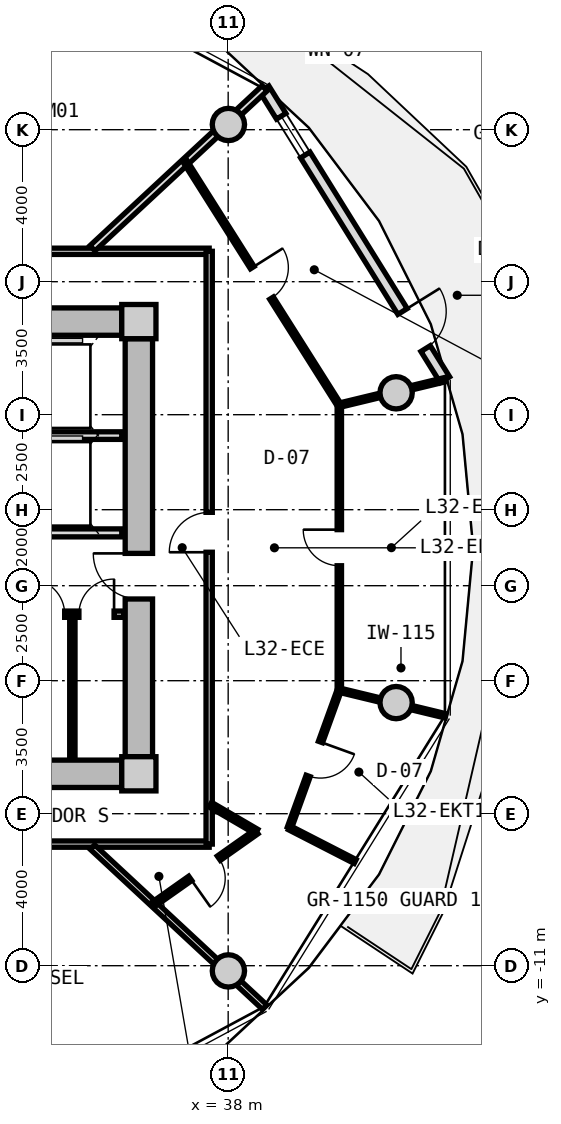
"""IFC4 building model, lengths in metres.
Left out: names, types, materials, properties, quantities, classifications, styles, units other than length and angle.
Written with IfcOpenShell. Run it as: python <this file> out.ifc"""

import sys

from ifc_helpers import new_model, si_unit, direction, frame, frame_2d, origin, origin_2d, place, context, subcontext, project, spatial, rectangle, circle, extrude, source, transform, mapped, element, fill, save


model = new_model("IFC4")
c1 = context("Model", 3, precision=1e-05, world=origin(), true_north=direction((0.0, 1.0)))
c2 = subcontext(c1, "Body", "Model", "MODEL_VIEW")
j1 = project(units=[si_unit("LENGTHUNIT", "METRE"), si_unit("PLANEANGLEUNIT", "RADIAN")], contexts=[c1])
p1 = place(None, origin())
s1 = spatial("IfcSite", under=j1, at=p1, CompositionType="ELEMENT")
p2 = place(p1, origin())
s2 = spatial("IfcBuilding", under=s1, at=p2, CompositionType="ELEMENT")
p3 = place(p2, frame((0.0, 0.0, 105.4)))
s3 = spatial("IfcBuildingStorey", under=s2, at=p3, CompositionType="ELEMENT", Elevation=105.4)
m1 = source(origin(), c2, "Body", "SweptSolid", [
    extrude(rectangle(XDim=0.9, YDim=0.9, at=origin_2d()), origin(), (0.0, 0.0, 1.0), 3.05),
])
for number, where, z_axis, x_axis in (
    (1, (35.65, -5.95, 0.0), (0.0, 0.0, 1.0), (1.0, 0.0, 0.0)),
    (2, (35.65, 5.95, 0.0), (0.0, 0.0, 1.0), (1.0, 0.0, 0.0)),
):
    element("IfcColumn", number, at=place(p3, frame(where, z_axis=z_axis, x_axis=x_axis)), inside=s3, PredefinedType="COLUMN", context=c2, shape_type="MappedRepresentation", body=[
        mapped(m1, transform((0.0, 0.0, 0.0), x_axis=(1.0, 0.0, 0.0), y_axis=(0.0, 1.0, 0.0), z_axis=(0.0, 0.0, 1.0), scale=1.0)),
    ])
m2 = source(origin(), c2, "Body", "SweptSolid", [
    extrude(rectangle(XDim=14.4, YDim=0.72, at=frame_2d((7.2, 0.0))), origin(), (0.0, 0.0, 1.0), 2.79),
])
for number, where, z_axis, x_axis in (
    (3, (20.8, 5.95, 0.0), (0.0, 0.0, 1.0), (1.0, 0.0, 0.0)),
    (4, (35.2, -5.95, 0.0), (0.0, 0.0, 1.0), (-1.0, 0.0, 0.0)),
):
    element("IfcWall", number, at=place(p3, frame(where, z_axis=z_axis, x_axis=x_axis)), inside=s3, PredefinedType="SHEAR", context=c2, shape_type="MappedRepresentation", body=[
        mapped(m2, transform((0.0, 0.0, 0.0), x_axis=(1.0, 0.0, 0.0), y_axis=(0.0, 1.0, 0.0), z_axis=(0.0, 0.0, 1.0), scale=1.0)),
    ])
m3 = source(origin(), c2, "Body", "SweptSolid", [
    extrude(rectangle(XDim=11.0, YDim=0.72, at=frame_2d((5.5, 0.0))), origin(), (0.0, 0.0, 1.0), 2.79),
])
p4 = place(p3, frame((35.65, 5.5, 0.0), z_axis=(0.0, 0.0, 1.0), x_axis=(0.0, -1.0, 0.0)))
e5 = element("IfcWall", 5, at=p4, inside=s3, PredefinedType="SHEAR", context=c2, shape_type="MappedRepresentation", body=[
    mapped(m3, transform((0.0, 0.0, 0.0), x_axis=(1.0, 0.0, 0.0), y_axis=(0.0, 1.0, 0.0), z_axis=(0.0, 0.0, 1.0), scale=1.0)),
])
p5 = place(p4, frame((5.65, 0.0, 0.0)))
e6 = element("IfcOpeningElement", 6, at=p5, cuts=e5, PredefinedType="OPENING", context=c2, shape_type="SweptSolid", body=[
    extrude(rectangle(XDim=1.2, YDim=2.15, at=frame_2d((0.6, 1.075))), frame((0.0, 0.37, 0.0), z_axis=(0.0, -1.0, 0.0), x_axis=(1.0, 0.0, 0.0)), (0.0, 0.0, 1.0), 0.74),
])
m4 = source(origin(), c2, "Body", "SweptSolid", [
    extrude(circle(Radius=0.425, at=origin_2d()), origin(), (0.0, 0.0, 1.0), 3.05),
])
for number, where, z_axis, x_axis in (
    (7, (42.419, 4.076, 0.0), (0.0, 0.0, 1.0), (1.0, 0.0, 0.0)),
    (8, (38.006, 11.137, 0.0), (0.0, 0.0, 1.0), (1.0, 0.0, 0.0)),
    (9, (38.006, -11.137, 0.0), (0.0, 0.0, 1.0), (1.0, 0.0, 0.0)),
    (10, (42.419, -4.076, 0.0), (0.0, 0.0, 1.0), (1.0, 0.0, 0.0)),
):
    element("IfcColumn", number, at=place(p3, frame(where, z_axis=z_axis, x_axis=x_axis)), inside=s3, PredefinedType="COLUMN", context=c2, shape_type="MappedRepresentation", body=[
        mapped(m4, transform((0.0, 0.0, 0.0), x_axis=(1.0, 0.0, 0.0), y_axis=(0.0, 1.0, 0.0), z_axis=(0.0, 0.0, 1.0), scale=1.0)),
    ])
m5 = source(origin(), c2, "Body", "SweptSolid", [
    extrude(rectangle(XDim=9.014, YDim=0.29, at=frame_2d((4.507, 0.0))), origin(), (0.0, 0.0, 1.0), 2.79),
])
p6 = place(p3, frame((38.947, 12.077, 0.0), z_axis=(0.0, 0.0, 1.0), x_axis=(0.527732945084, -0.849410347637, 0.0)))
e11 = element("IfcWall", 11, at=p6, inside=s3, PredefinedType="SOLIDWALL", context=c2, shape_type="MappedRepresentation", body=[
    mapped(m5, transform((0.0, 0.0, 0.0), x_axis=(1.0, 0.0, 0.0), y_axis=(0.0, 1.0, 0.0), z_axis=(0.0, 0.0, 1.0), scale=1.0)),
])
p7 = place(p6, frame((6.9, 0.0, 0.0)))
e12 = element("IfcOpeningElement", 12, at=p7, cuts=e11, PredefinedType="OPENING", context=c2, shape_type="SweptSolid", body=[
    extrude(rectangle(XDim=1.15, YDim=2.25, at=frame_2d((0.575, 1.125))), frame((0.0, 0.155, 0.0), z_axis=(0.0, -1.0, 0.0), x_axis=(1.0, 0.0, 0.0)), (0.0, 0.0, 1.0), 0.31),
])
p8 = place(p6, frame((0.85, 0.0, 0.85)))
e13 = element("IfcOpeningElement", 13, at=p8, cuts=e11, PredefinedType="OPENING", context=c2, shape_type="SweptSolid", body=[
    extrude(rectangle(XDim=1.2, YDim=1.5, at=frame_2d((0.6, 0.75))), frame((0.0, 0.155, 0.0), z_axis=(0.0, -1.0, 0.0), x_axis=(1.0, 0.0, 0.0)), (0.0, 0.0, 1.0), 0.31),
])
m6 = source(origin(), c2, "Body", "SweptSolid", [
    extrude(rectangle(XDim=3.2, YDim=0.2, at=frame_2d((1.6, 0.0))), origin(), (0.0, 0.0, 1.0), 2.775),
])
p9 = place(p3, frame((32.0, 2.95, 0.0), z_axis=(0.0, 0.0, 1.0), x_axis=(1.0, 0.0, 0.0)))
e14 = element("IfcWall", 14, at=p9, inside=s3, PredefinedType="PARTITIONING", context=c2, shape_type="MappedRepresentation", body=[
    mapped(m6, transform((0.0, 0.0, 0.0), x_axis=(1.0, 0.0, 0.0), y_axis=(0.0, 1.0, 0.0), z_axis=(0.0, 0.0, 1.0), scale=1.0)),
])
m7 = source(origin(), c2, "Body", "SweptSolid", [
    extrude(rectangle(XDim=6.66, YDim=0.21, at=frame_2d((3.33, 0.0))), origin(), (0.0, 0.0, 1.0), 2.775),
])
p10 = place(p3, frame((28.54, 0.39, 0.0), z_axis=(0.0, 0.0, 1.0), x_axis=(1.0, 0.0, 0.0)))
e15 = element("IfcWall", 15, at=p10, inside=s3, PredefinedType="PARTITIONING", context=c2, shape_type="MappedRepresentation", body=[
    mapped(m7, transform((0.0, 0.0, 0.0), x_axis=(1.0, 0.0, 0.0), y_axis=(0.0, 1.0, 0.0), z_axis=(0.0, 0.0, 1.0), scale=1.0)),
])
p11 = place(p10, frame((1.0, 0.0, 0.0)))
e16 = element("IfcOpeningElement", 16, at=p11, cuts=e15, PredefinedType="OPENING", context=c2, shape_type="SweptSolid", body=[
    extrude(rectangle(XDim=1.2, YDim=2.15, at=frame_2d((0.6, 1.075))), frame((0.0, 0.115, 0.0), z_axis=(0.0, -1.0, 0.0), x_axis=(1.0, 0.0, 0.0)), (0.0, 0.0, 1.0), 0.23),
])
m8 = source(origin(), c2, "Body", "SweptSolid", [
    extrude(rectangle(XDim=2.7, YDim=0.165, at=frame_2d((1.35, 0.0))), origin(), (0.0, 0.0, 1.0), 2.775),
])
p12 = place(p3, frame((32.55, -1.75, 0.0), z_axis=(0.0, 0.0, 1.0), x_axis=(1.0, 0.0, 0.0)))
e17 = element("IfcWall", 17, at=p12, inside=s3, PredefinedType="PARTITIONING", context=c2, shape_type="MappedRepresentation", body=[
    mapped(m8, transform((0.0, 0.0, 0.0), x_axis=(1.0, 0.0, 0.0), y_axis=(0.0, 1.0, 0.0), z_axis=(0.0, 0.0, 1.0), scale=1.0)),
])
p13 = place(p12, frame((0.222, 0.0, 0.0)))
e18 = element("IfcOpeningElement", 18, at=p13, cuts=e17, PredefinedType="OPENING", context=c2, shape_type="SweptSolid", body=[
    extrude(rectangle(XDim=0.925, YDim=2.1, at=frame_2d((0.462, 1.05))), frame((0.0, 0.093, 0.0), z_axis=(0.0, -1.0, 0.0), x_axis=(1.0, 0.0, 0.0)), (0.0, 0.0, 1.0), 0.185),
])
p14 = place(p12, frame((1.522, 0.0, 0.0)))
e19 = element("IfcOpeningElement", 19, at=p14, cuts=e17, PredefinedType="OPENING", context=c2, shape_type="SweptSolid", body=[
    extrude(rectangle(XDim=0.925, YDim=2.1, at=frame_2d((0.462, 1.05))), frame((0.0, 0.093, 0.0), z_axis=(0.0, -1.0, 0.0), x_axis=(1.0, 0.0, 0.0)), (0.0, 0.0, 1.0), 0.185),
])
m9 = source(origin(), c2, "Body", "SweptSolid", [
    extrude(rectangle(XDim=3.8, YDim=0.14, at=frame_2d((1.9, 0.0))), origin(), (0.0, 0.0, 1.0), 2.775),
])
p15 = place(p3, frame((33.9, -5.55, 0.0), z_axis=(0.0, 0.0, 1.0), x_axis=(0.0, 1.0, 0.0)))
e20 = element("IfcWall", 20, at=p15, inside=s3, PredefinedType="PARTITIONING", context=c2, shape_type="MappedRepresentation", body=[
    mapped(m9, transform((0.0, 0.0, 0.0), x_axis=(1.0, 0.0, 0.0), y_axis=(0.0, 1.0, 0.0), z_axis=(0.0, 0.0, 1.0), scale=1.0)),
])
m10 = source(origin(), c2, "Body", "SweptSolid", [
    extrude(rectangle(XDim=9.234, YDim=0.165, at=frame_2d((4.617, 0.0))), origin(), (0.0, 0.0, 1.0), 2.775),
])
p16 = place(p3, frame((28.266, 7.8, 0.0), z_axis=(0.0, 0.0, 1.0), x_axis=(1.0, 0.0, 0.0)))
e21 = element("IfcWall", 21, at=p16, inside=s3, PredefinedType="PARTITIONING", context=c2, shape_type="MappedRepresentation", body=[
    mapped(m10, transform((0.0, 0.0, 0.0), x_axis=(1.0, 0.0, 0.0), y_axis=(0.0, 1.0, 0.0), z_axis=(0.0, 0.0, 1.0), scale=1.0)),
])
p17 = place(p16, frame((2.588, 0.0, 0.0)))
e22 = element("IfcOpeningElement", 22, at=p17, cuts=e21, PredefinedType="OPENING", context=c2, shape_type="SweptSolid", body=[
    extrude(rectangle(XDim=1.25, YDim=2.2, at=frame_2d((0.625, 1.1))), frame((0.0, 0.093, 0.0), z_axis=(0.0, -1.0, 0.0), x_axis=(1.0, 0.0, 0.0)), (0.0, 0.0, 1.0), 0.185),
])
m11 = source(origin(), c2, "Body", "SweptSolid", [
    extrude(rectangle(XDim=8.6, YDim=0.165, at=frame_2d((4.3, 0.0))), origin(), (0.0, 0.0, 1.0), 2.775),
])
p18 = place(p3, frame((37.5, -7.8, 0.0), z_axis=(0.0, 0.0, 1.0), x_axis=(-1.0, 0.0, 0.0)))
e23 = element("IfcWall", 23, at=p18, inside=s3, PredefinedType="PARTITIONING", context=c2, shape_type="MappedRepresentation", body=[
    mapped(m11, transform((0.0, 0.0, 0.0), x_axis=(1.0, 0.0, 0.0), y_axis=(0.0, 1.0, 0.0), z_axis=(0.0, 0.0, 1.0), scale=1.0)),
])
m12 = source(origin(), c2, "Body", "SweptSolid", [
    extrude(rectangle(XDim=15.6, YDim=0.165, at=frame_2d((7.8, 0.0))), origin(), (0.0, 0.0, 1.0), 2.775),
])
p19 = place(p3, frame((37.5, 7.8, 0.0), z_axis=(0.0, 0.0, 1.0), x_axis=(0.0, -1.0, 0.0)))
e24 = element("IfcWall", 24, at=p19, inside=s3, PredefinedType="PARTITIONING", context=c2, shape_type="MappedRepresentation", body=[
    mapped(m12, transform((0.0, 0.0, 0.0), x_axis=(1.0, 0.0, 0.0), y_axis=(0.0, 1.0, 0.0), z_axis=(0.0, 0.0, 1.0), scale=1.0)),
])
p20 = place(p19, frame((6.87, 0.0, 0.0)))
e25 = element("IfcOpeningElement", 25, at=p20, cuts=e24, PredefinedType="OPENING", context=c2, shape_type="SweptSolid", body=[
    extrude(rectangle(XDim=1.05, YDim=2.15, at=frame_2d((0.525, 1.075))), frame((0.0, 0.093, 0.0), z_axis=(0.0, -1.0, 0.0), x_axis=(1.0, 0.0, 0.0)), (0.0, 0.0, 1.0), 0.185),
])
m13 = source(origin(), c2, "Body", "SweptSolid", [
    extrude(rectangle(XDim=6.187, YDim=0.165, at=frame_2d((3.093, 0.0))), origin(), (0.0, 0.0, 1.0), 2.275),
])
p21 = place(p3, frame((34.429, -7.88, 0.0), z_axis=(0.0, 0.0, 1.0), x_axis=(0.732501077882, -0.680765870841, 0.0)))
e26 = element("IfcWall", 26, at=p21, inside=s3, PredefinedType="PARTITIONING", context=c2, shape_type="MappedRepresentation", body=[
    mapped(m13, transform((0.0, 0.0, 0.0), x_axis=(1.0, 0.0, 0.0), y_axis=(0.0, 1.0, 0.0), z_axis=(0.0, 0.0, 1.0), scale=1.0)),
])
m14 = source(origin(), c2, "Body", "SweptSolid", [
    extrude(rectangle(XDim=6.187, YDim=0.19, at=frame_2d((3.093, 0.0))), origin(), (0.0, 0.0, 1.0), 2.415),
])
p22 = place(p3, frame((34.429, 7.88, 0.0), z_axis=(0.0, 0.0, 1.0), x_axis=(0.732501077882, 0.680765870841, 0.0)))
e27 = element("IfcWall", 27, at=p22, inside=s3, PredefinedType="PARTITIONING", context=c2, shape_type="MappedRepresentation", body=[
    mapped(m14, transform((0.0, 0.0, 0.0), x_axis=(1.0, 0.0, 0.0), y_axis=(0.0, 1.0, 0.0), z_axis=(0.0, 0.0, 1.0), scale=1.0)),
])
m15 = source(origin(), c2, "Body", "SweptSolid", [
    extrude(rectangle(XDim=7.499, YDim=0.115, at=frame_2d((3.75, 0.0))), origin(), (0.0, 0.0, 1.0), 2.775),
])
p23 = place(p3, frame((40.925, -3.75, 0.0), z_axis=(0.0, 0.0, 1.0), x_axis=(0.0, 1.0, 0.0)))
e28 = element("IfcWall", 28, at=p23, inside=s3, PredefinedType="PARTITIONING", context=c2, shape_type="MappedRepresentation", body=[
    mapped(m15, transform((0.0, 0.0, 0.0), x_axis=(1.0, 0.0, 0.0), y_axis=(0.0, 1.0, 0.0), z_axis=(0.0, 0.0, 1.0), scale=1.0)),
])
p24 = place(p23, frame((3.275, 0.0, 0.0)))
e29 = element("IfcOpeningElement", 29, at=p24, cuts=e28, PredefinedType="OPENING", context=c2, shape_type="SweptSolid", body=[
    extrude(rectangle(XDim=0.95, YDim=2.1, at=frame_2d((0.475, 1.05))), frame((0.0, 0.067, 0.0), z_axis=(0.0, -1.0, 0.0), x_axis=(1.0, 0.0, 0.0)), (0.0, 0.0, 1.0), 0.135),
])
m16 = source(origin(), c2, "Body", "SweptSolid", [
    extrude(rectangle(XDim=2.879, YDim=0.115, at=frame_2d((1.439, 0.0))), origin(), (0.0, 0.0, 1.0), 2.275),
])
p25 = place(p3, frame((40.925, -3.75, 0.0), z_axis=(0.0, 0.0, 1.0), x_axis=(0.972018140943, -0.234905797454, 0.0)))
e30 = element("IfcWall", 30, at=p25, inside=s3, PredefinedType="PARTITIONING", context=c2, shape_type="MappedRepresentation", body=[
    mapped(m16, transform((0.0, 0.0, 0.0), x_axis=(1.0, 0.0, 0.0), y_axis=(0.0, 1.0, 0.0), z_axis=(0.0, 0.0, 1.0), scale=1.0)),
])
m17 = source(origin(), c2, "Body", "SweptSolid", [
    extrude(rectangle(XDim=7.618, YDim=0.115, at=frame_2d((3.809, 0.0))), origin(), (0.0, 0.0, 1.0), 2.775),
])
p26 = place(p3, frame((40.923, 3.749, 0.0), z_axis=(0.0, 0.0, 1.0), x_axis=(-0.534316104929, 0.845284744931, 0.0)))
e31 = element("IfcWall", 31, at=p26, inside=s3, PredefinedType="PARTITIONING", context=c2, shape_type="MappedRepresentation", body=[
    mapped(m17, transform((0.0, 0.0, 0.0), x_axis=(1.0, 0.0, 0.0), y_axis=(0.0, 1.0, 0.0), z_axis=(0.0, 0.0, 1.0), scale=1.0)),
])
p27 = place(p26, frame((3.334, 0.0, 0.0)))
e32 = element("IfcOpeningElement", 32, at=p27, cuts=e31, PredefinedType="OPENING", context=c2, shape_type="SweptSolid", body=[
    extrude(rectangle(XDim=0.95, YDim=2.1, at=frame_2d((0.475, 1.05))), frame((0.0, 0.067, 0.0), z_axis=(0.0, -1.0, 0.0), x_axis=(1.0, 0.0, 0.0)), (0.0, 0.0, 1.0), 0.135),
])
m18 = source(origin(), c2, "Body", "SweptSolid", [
    extrude(rectangle(XDim=2.881, YDim=0.115, at=frame_2d((1.44, 0.0))), origin(), (0.0, 0.0, 1.0), 2.275),
])
p28 = place(p3, frame((40.923, 3.749, 0.0), z_axis=(0.0, 0.0, 1.0), x_axis=(0.972031524605, 0.234850410208, 0.0)))
e33 = element("IfcWall", 33, at=p28, inside=s3, PredefinedType="PARTITIONING", context=c2, shape_type="MappedRepresentation", body=[
    mapped(m18, transform((0.0, 0.0, 0.0), x_axis=(1.0, 0.0, 0.0), y_axis=(0.0, 1.0, 0.0), z_axis=(0.0, 0.0, 1.0), scale=1.0)),
])
m19 = source(origin(), c2, "Body", "SweptSolid", [
    extrude(rectangle(XDim=1.407, YDim=0.14, at=frame_2d((0.704, 0.0))), origin(), (0.0, 0.0, 1.0), 2.775),
])
p29 = place(p3, frame((37.53, -6.762, 0.0), z_axis=(0.0, 0.0, 1.0), x_axis=(0.863539718977, -0.504280828258, 0.0)))
e34 = element("IfcWall", 34, at=p29, inside=s3, PredefinedType="PARTITIONING", context=c2, shape_type="MappedRepresentation", body=[
    mapped(m19, transform((0.0, 0.0, 0.0), x_axis=(1.0, 0.0, 0.0), y_axis=(0.0, 1.0, 0.0), z_axis=(0.0, 0.0, 1.0), scale=1.0)),
])
m20 = source(origin(), c2, "Body", "SweptSolid", [
    extrude(rectangle(XDim=3.347, YDim=0.14, at=frame_2d((1.673, 0.0))), origin(), (0.0, 0.0, 1.0), 2.775),
])
p30 = place(p3, frame((38.745, -7.472, 0.0), z_axis=(0.0, 0.0, 1.0), x_axis=(-0.81705680263, -0.576557179537, 0.0)))
e35 = element("IfcWall", 35, at=p30, inside=s3, PredefinedType="PARTITIONING", context=c2, shape_type="MappedRepresentation", body=[
    mapped(m20, transform((0.0, 0.0, 0.0), x_axis=(1.0, 0.0, 0.0), y_axis=(0.0, 1.0, 0.0), z_axis=(0.0, 0.0, 1.0), scale=1.0)),
])
p31 = place(p30, frame((1.214, 0.0, 0.0)))
e36 = element("IfcOpeningElement", 36, at=p31, cuts=e35, PredefinedType="OPENING", context=c2, shape_type="SweptSolid", body=[
    extrude(rectangle(XDim=0.92, YDim=2.1, at=frame_2d((0.46, 1.05))), frame((0.0, 0.08, 0.0), z_axis=(0.0, -1.0, 0.0), x_axis=(1.0, 0.0, 0.0)), (0.0, 0.0, 1.0), 0.16),
])
m21 = source(origin(), c2, "Body", "SweptSolid", [
    extrude(rectangle(XDim=1.945, YDim=0.115, at=frame_2d((0.973, 0.0))), origin(), (0.0, 0.0, 1.0), 2.775),
])
p32 = place(p3, frame((39.611, -7.37, 0.0), z_axis=(0.0, 0.0, 1.0), x_axis=(0.889684148329, -0.456576517368, 0.0)))
e37 = element("IfcWall", 37, at=p32, inside=s3, PredefinedType="PARTITIONING", context=c2, shape_type="MappedRepresentation", body=[
    mapped(m21, transform((0.0, 0.0, 0.0), x_axis=(1.0, 0.0, 0.0), y_axis=(0.0, 1.0, 0.0), z_axis=(0.0, 0.0, 1.0), scale=1.0)),
])
m22 = source(origin(), c2, "Body", "SweptSolid", [
    extrude(rectangle(XDim=3.852, YDim=0.115, at=frame_2d((1.926, 0.0))), origin(), (0.0, 0.0, 1.0), 2.775),
])
p33 = place(p3, frame((39.611, -7.37, 0.0), z_axis=(0.0, 0.0, 1.0), x_axis=(0.340653649518, 0.940188859257, 0.0)))
e38 = element("IfcWall", 38, at=p33, inside=s3, PredefinedType="PARTITIONING", context=c2, shape_type="MappedRepresentation", body=[
    mapped(m22, transform((0.0, 0.0, 0.0), x_axis=(1.0, 0.0, 0.0), y_axis=(0.0, 1.0, 0.0), z_axis=(0.0, 0.0, 1.0), scale=1.0)),
])
p34 = place(p33, frame((1.451, 0.0, 0.0)))
e39 = element("IfcOpeningElement", 39, at=p34, cuts=e38, PredefinedType="OPENING", context=c2, shape_type="SweptSolid", body=[
    extrude(rectangle(XDim=0.95, YDim=2.1, at=frame_2d((0.475, 1.05))), frame((0.0, 0.067, 0.0), z_axis=(0.0, -1.0, 0.0), x_axis=(1.0, 0.0, 0.0)), (0.0, 0.0, 1.0), 0.135),
])
m23 = source(origin(), c2, "Body", "SweptSolid", [
    extrude(rectangle(XDim=1.15, YDim=2.25, at=frame_2d((0.575, 1.125))), frame((0.0, 0.025, 0.0), z_axis=(0.0, -1.0, 0.0), x_axis=(1.0, 0.0, 0.0)), (0.0, 0.0, 1.0), 0.05),
])
p35 = place(p7, origin())
e40 = element("IfcDoor", 40, at=p35, inside=s3, OperationType="SINGLE_SWING_LEFT", PredefinedType="DOOR", context=c2, shape_type="MappedRepresentation", body=[
    mapped(m23, transform((0.0, 0.0, 0.0), x_axis=(1.0, 0.0, 0.0), y_axis=(0.0, 1.0, 0.0), z_axis=(0.0, 0.0, 1.0), scale=1.0)),
])
fill(e12, e40)
m24 = source(origin(), c2, "Body", "SweptSolid", [
    extrude(rectangle(XDim=1.2, YDim=1.5, at=frame_2d((0.6, 0.75))), frame((0.0, 0.03, 0.0), z_axis=(0.0, -1.0, 0.0), x_axis=(1.0, 0.0, 0.0)), (0.0, 0.0, 1.0), 0.06),
])
p36 = place(p8, origin())
e41 = element("IfcWindow", 41, at=p36, inside=s3, PartitioningType="SINGLE_PANEL", PredefinedType="WINDOW", context=c2, shape_type="MappedRepresentation", body=[
    mapped(m24, transform((0.0, 0.0, 0.0), x_axis=(1.0, 0.0, 0.0), y_axis=(0.0, 1.0, 0.0), z_axis=(0.0, 0.0, 1.0), scale=1.0)),
])
fill(e13, e41)
m25 = source(origin(), c2, "Body", "SweptSolid", [
    extrude(rectangle(XDim=1.2, YDim=2.15, at=frame_2d((0.6, 1.075))), frame((0.0, 0.025, 0.0), z_axis=(0.0, -1.0, 0.0), x_axis=(1.0, 0.0, 0.0)), (0.0, 0.0, 1.0), 0.05),
])
p37 = place(p5, frame((1.2, 0.0, 0.0), z_axis=(0.0, 0.0, 1.0), x_axis=(-1.0, 0.0, 0.0)))
e42 = element("IfcDoor", 42, at=p37, inside=s3, OperationType="SINGLE_SWING_RIGHT", PredefinedType="DOOR", context=c2, shape_type="MappedRepresentation", body=[
    mapped(m25, transform((0.0, 0.0, 0.0), x_axis=(1.0, 0.0, 0.0), y_axis=(0.0, 1.0, 0.0), z_axis=(0.0, 0.0, 1.0), scale=1.0)),
])
fill(e6, e42)
m26 = source(origin(), c2, "Body", "SweptSolid", [
    extrude(rectangle(XDim=0.925, YDim=2.1, at=frame_2d((0.462, 1.05))), frame((0.0, 0.025, 0.0), z_axis=(0.0, -1.0, 0.0), x_axis=(1.0, 0.0, 0.0)), (0.0, 0.0, 1.0), 0.05),
])
p38 = place(p13, origin())
e43 = element("IfcDoor", 43, at=p38, inside=s3, OperationType="SINGLE_SWING_LEFT", PredefinedType="DOOR", context=c2, shape_type="MappedRepresentation", body=[
    mapped(m26, transform((0.0, 0.0, 0.0), x_axis=(1.0, 0.0, 0.0), y_axis=(0.0, 1.0, 0.0), z_axis=(0.0, 0.0, 1.0), scale=1.0)),
])
fill(e18, e43)
p39 = place(p14, origin())
e44 = element("IfcDoor", 44, at=p39, inside=s3, OperationType="SINGLE_SWING_RIGHT", PredefinedType="DOOR", context=c2, shape_type="MappedRepresentation", body=[
    mapped(m26, transform((0.0, 0.0, 0.0), x_axis=(1.0, 0.0, 0.0), y_axis=(0.0, 1.0, 0.0), z_axis=(0.0, 0.0, 1.0), scale=1.0)),
])
fill(e19, e44)
m27 = source(origin(), c2, "Body", "SweptSolid", [
    extrude(rectangle(XDim=1.05, YDim=2.15, at=frame_2d((0.525, 1.075))), frame((0.0, 0.025, 0.0), z_axis=(0.0, -1.0, 0.0), x_axis=(1.0, 0.0, 0.0)), (0.0, 0.0, 1.0), 0.05),
])
p40 = place(p20, frame((1.05, 0.0, 0.0), z_axis=(0.0, 0.0, 1.0), x_axis=(-1.0, 0.0, 0.0)))
e45 = element("IfcDoor", 45, at=p40, inside=s3, OperationType="SINGLE_SWING_LEFT", PredefinedType="DOOR", context=c2, shape_type="MappedRepresentation", body=[
    mapped(m27, transform((0.0, 0.0, 0.0), x_axis=(1.0, 0.0, 0.0), y_axis=(0.0, 1.0, 0.0), z_axis=(0.0, 0.0, 1.0), scale=1.0)),
])
fill(e25, e45)
m28 = source(origin(), c2, "Body", "SweptSolid", [
    extrude(rectangle(XDim=0.92, YDim=2.1, at=frame_2d((0.46, 1.05))), frame((0.0, 0.025, 0.0), z_axis=(0.0, -1.0, 0.0), x_axis=(1.0, 0.0, 0.0)), (0.0, 0.0, 1.0), 0.05),
])
p41 = place(p31, origin())
e46 = element("IfcDoor", 46, at=p41, inside=s3, OperationType="SINGLE_SWING_RIGHT", PredefinedType="DOOR", context=c2, shape_type="MappedRepresentation", body=[
    mapped(m28, transform((0.0, 0.0, 0.0), x_axis=(1.0, 0.0, 0.0), y_axis=(0.0, 1.0, 0.0), z_axis=(0.0, 0.0, 1.0), scale=1.0)),
])
fill(e36, e46)
m29 = source(origin(), c2, "Body", "SweptSolid", [
    extrude(rectangle(XDim=0.95, YDim=2.1, at=frame_2d((0.475, 1.05))), frame((0.0, 0.025, 0.0), z_axis=(0.0, -1.0, 0.0), x_axis=(1.0, 0.0, 0.0)), (0.0, 0.0, 1.0), 0.05),
])
p42 = place(p34, frame((0.95, 0.0, 0.0), z_axis=(0.0, 0.0, 1.0), x_axis=(-1.0, 0.0, 0.0)))
e47 = element("IfcDoor", 47, at=p42, inside=s3, OperationType="SINGLE_SWING_LEFT", PredefinedType="DOOR", context=c2, shape_type="MappedRepresentation", body=[
    mapped(m29, transform((0.0, 0.0, 0.0), x_axis=(1.0, 0.0, 0.0), y_axis=(0.0, 1.0, 0.0), z_axis=(0.0, 0.0, 1.0), scale=1.0)),
])
fill(e39, e47)
p43 = place(p24, origin())
e48 = element("IfcDoor", 48, at=p43, inside=s3, OperationType="SINGLE_SWING_RIGHT", PredefinedType="DOOR", context=c2, shape_type="MappedRepresentation", body=[
    mapped(m29, transform((0.0, 0.0, 0.0), x_axis=(1.0, 0.0, 0.0), y_axis=(0.0, 1.0, 0.0), z_axis=(0.0, 0.0, 1.0), scale=1.0)),
])
fill(e29, e48)
p44 = place(p27, frame((0.95, 0.0, 0.0), z_axis=(0.0, 0.0, 1.0), x_axis=(-1.0, 0.0, 0.0)))
e49 = element("IfcDoor", 49, at=p44, inside=s3, OperationType="SINGLE_SWING_LEFT", PredefinedType="DOOR", context=c2, shape_type="MappedRepresentation", body=[
    mapped(m29, transform((0.0, 0.0, 0.0), x_axis=(1.0, 0.0, 0.0), y_axis=(0.0, 1.0, 0.0), z_axis=(0.0, 0.0, 1.0), scale=1.0)),
])
fill(e32, e49)
save(model, sys.argv[1])
